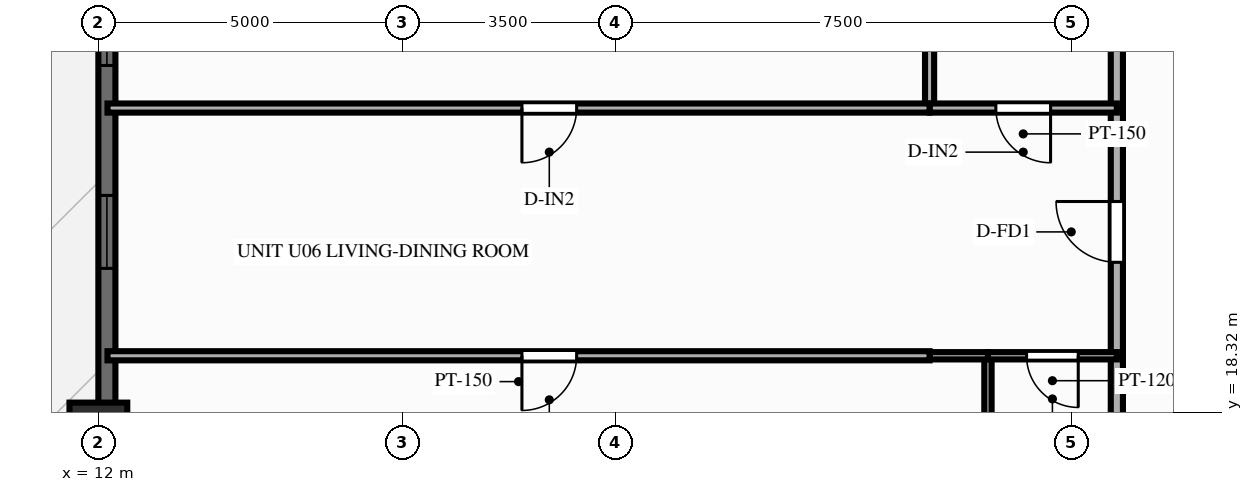
"""IFC4 building model, lengths in metres.
Left out: names, types, materials, properties, quantities, classifications, styles, units other than length and angle.
Written with IfcOpenShell. Run it as: python <this file> out.ifc"""

import sys

from ifc_helpers import new_model, si_unit, direction, frame, frame_2d, origin, origin_2d, place, context, subcontext, project, spatial, rectangle, extrude, source, transform, mapped, element, fill, save


model = new_model("IFC4")
c1 = context("Model", 3, precision=1e-05, world=origin(), true_north=direction((0.0, 1.0)))
c2 = subcontext(c1, "Body", "Model", "MODEL_VIEW")
j1 = project(units=[si_unit("LENGTHUNIT", "METRE"), si_unit("PLANEANGLEUNIT", "RADIAN")], contexts=[c1])
p1 = place(None, origin())
s1 = spatial("IfcSite", under=j1, at=p1, CompositionType="ELEMENT")
p2 = place(p1, origin())
s2 = spatial("IfcBuilding", under=s1, at=p2, CompositionType="ELEMENT")
p3 = place(p2, frame((0.0, 0.0, 113.85)))
s3 = spatial("IfcBuildingStorey", under=s2, at=p3, CompositionType="ELEMENT", Elevation=113.85)
m1 = source(origin(), c2, "Body", "SweptSolid", [
    extrude(rectangle(XDim=0.95, YDim=0.95, at=origin_2d()), origin(), (0.0, 0.0, 1.0), 3.0),
])
p4 = place(p3, frame((12.0, 18.0, 0.0), z_axis=(0.0, 0.0, 1.0), x_axis=(1.0, 0.0, 0.0)))
e1 = element("IfcColumn", 1, at=p4, inside=s3, PredefinedType="COLUMN", context=c2, shape_type="MappedRepresentation", body=[
    mapped(m1, transform((0.0, 0.0, 0.0), scale=1.0)),
])
p5 = place(p3, frame((12.14, 7.2, 0.0), z_axis=(0.0, 0.0, 1.0), x_axis=(0.0, 1.0, 0.0)))
e2 = element("IfcWall", 2, at=p5, inside=s3, PredefinedType="SOLIDWALL", context=c2, shape_type="SweptSolid", body=[
    extrude(rectangle(XDim=39.6, YDim=0.28, at=frame_2d((19.8, 0.0))), origin(), (0.0, 0.0, 1.0), 2.28),
])
p6 = place(p5, frame((0.945, 0.0, 0.25)))
e3 = element("IfcOpeningElement", 3, at=p6, cuts=e2, PredefinedType="OPENING", context=c2, shape_type="SweptSolid", body=[
    extrude(rectangle(XDim=1.2, YDim=1.5, at=frame_2d((0.6, 0.75))), frame((0.0, 0.152, 0.0), z_axis=(0.0, -1.0, 0.0), x_axis=(1.0, 0.0, 0.0)), (0.0, 0.0, 1.0), 0.304),
])
p7 = place(p5, frame((4.213, 0.0, 0.25)))
e4 = element("IfcOpeningElement", 4, at=p7, cuts=e2, PredefinedType="OPENING", context=c2, shape_type="SweptSolid", body=[
    extrude(rectangle(XDim=1.2, YDim=1.5, at=frame_2d((0.6, 0.75))), frame((0.0, 0.152, 0.0), z_axis=(0.0, -1.0, 0.0), x_axis=(1.0, 0.0, 0.0)), (0.0, 0.0, 1.0), 0.304),
])
p8 = place(p5, frame((7.55, 0.0, 0.25)))
e5 = element("IfcOpeningElement", 5, at=p8, cuts=e2, PredefinedType="OPENING", context=c2, shape_type="SweptSolid", body=[
    extrude(rectangle(XDim=1.2, YDim=1.5, at=frame_2d((0.6, 0.75))), frame((0.0, 0.152, 0.0), z_axis=(0.0, -1.0, 0.0), x_axis=(1.0, 0.0, 0.0)), (0.0, 0.0, 1.0), 0.304),
])
p9 = place(p5, frame((13.483, 0.0, 0.25)))
e6 = element("IfcOpeningElement", 6, at=p9, cuts=e2, PredefinedType="OPENING", context=c2, shape_type="SweptSolid", body=[
    extrude(rectangle(XDim=1.2, YDim=1.5, at=frame_2d((0.6, 0.75))), frame((0.0, 0.152, 0.0), z_axis=(0.0, -1.0, 0.0), x_axis=(1.0, 0.0, 0.0)), (0.0, 0.0, 1.0), 0.304),
])
p10 = place(p5, frame((16.82, 0.0, 0.25)))
e7 = element("IfcOpeningElement", 7, at=p10, cuts=e2, PredefinedType="OPENING", context=c2, shape_type="SweptSolid", body=[
    extrude(rectangle(XDim=1.2, YDim=1.5, at=frame_2d((0.6, 0.75))), frame((0.0, 0.152, 0.0), z_axis=(0.0, -1.0, 0.0), x_axis=(1.0, 0.0, 0.0)), (0.0, 0.0, 1.0), 0.304),
])
p11 = place(p5, frame((19.2, 0.0, 0.25)))
e8 = element("IfcOpeningElement", 8, at=p11, cuts=e2, PredefinedType="OPENING", context=c2, shape_type="SweptSolid", body=[
    extrude(rectangle(XDim=1.2, YDim=1.5, at=frame_2d((0.6, 0.75))), frame((0.0, 0.152, 0.0), z_axis=(0.0, -1.0, 0.0), x_axis=(1.0, 0.0, 0.0)), (0.0, 0.0, 1.0), 0.304),
])
p12 = place(p5, frame((21.992, 0.0, 0.0)))
e9 = element("IfcOpeningElement", 9, at=p12, cuts=e2, PredefinedType="OPENING", context=c2, shape_type="SweptSolid", body=[
    extrude(rectangle(XDim=1.6, YDim=2.15, at=frame_2d((0.8, 1.075))), frame((0.0, 0.152, 0.0), z_axis=(0.0, -1.0, 0.0), x_axis=(1.0, 0.0, 0.0)), (0.0, 0.0, 1.0), 0.304),
])
p13 = place(p5, frame((25.529, 0.0, 0.25)))
e10 = element("IfcOpeningElement", 10, at=p13, cuts=e2, PredefinedType="OPENING", context=c2, shape_type="SweptSolid", body=[
    extrude(rectangle(XDim=1.2, YDim=1.5, at=frame_2d((0.6, 0.75))), frame((0.0, 0.152, 0.0), z_axis=(0.0, -1.0, 0.0), x_axis=(1.0, 0.0, 0.0)), (0.0, 0.0, 1.0), 0.304),
])
p14 = place(p5, frame((29.349, 0.0, 0.25)))
e11 = element("IfcOpeningElement", 11, at=p14, cuts=e2, PredefinedType="OPENING", context=c2, shape_type="SweptSolid", body=[
    extrude(rectangle(XDim=0.7, YDim=1.5, at=frame_2d((0.35, 0.75))), frame((0.0, 0.152, 0.0), z_axis=(0.0, -1.0, 0.0), x_axis=(1.0, 0.0, 0.0)), (0.0, 0.0, 1.0), 0.304),
])
p15 = place(p5, frame((31.285, 0.0, 0.25)))
e12 = element("IfcOpeningElement", 12, at=p15, cuts=e2, PredefinedType="OPENING", context=c2, shape_type="SweptSolid", body=[
    extrude(rectangle(XDim=1.2, YDim=1.5, at=frame_2d((0.6, 0.75))), frame((0.0, 0.152, 0.0), z_axis=(0.0, -1.0, 0.0), x_axis=(1.0, 0.0, 0.0)), (0.0, 0.0, 1.0), 0.304),
])
p16 = place(p5, frame((34.252, 0.0, 0.25)))
e13 = element("IfcOpeningElement", 13, at=p16, cuts=e2, PredefinedType="OPENING", context=c2, shape_type="SweptSolid", body=[
    extrude(rectangle(XDim=1.2, YDim=1.5, at=frame_2d((0.6, 0.75))), frame((0.0, 0.152, 0.0), z_axis=(0.0, -1.0, 0.0), x_axis=(1.0, 0.0, 0.0)), (0.0, 0.0, 1.0), 0.304),
])
p17 = place(p5, frame((37.151, 0.0, 0.25)))
e14 = element("IfcOpeningElement", 14, at=p17, cuts=e2, PredefinedType="OPENING", context=c2, shape_type="SweptSolid", body=[
    extrude(rectangle(XDim=1.2, YDim=1.5, at=frame_2d((0.6, 0.75))), frame((0.0, 0.152, 0.0), z_axis=(0.0, -1.0, 0.0), x_axis=(1.0, 0.0, 0.0)), (0.0, 0.0, 1.0), 0.304),
])
p18 = place(p3, frame((28.75, 16.65, 0.0), z_axis=(0.0, 0.0, 1.0), x_axis=(0.0, 1.0, 0.0)))
e15 = element("IfcWall", 15, at=p18, inside=s3, PredefinedType="PARTITIONING", context=c2, shape_type="SweptSolid", body=[
    extrude(rectangle(XDim=2.596, YDim=0.2, at=frame_2d((1.298, 0.0))), origin(), (0.0, 0.0, 1.0), 2.79),
])
p19 = place(p3, frame((28.75, 19.246, 0.0), z_axis=(0.0, 0.0, 1.0), x_axis=(0.0, 1.0, 0.0)))
e16 = element("IfcWall", 16, at=p19, inside=s3, PredefinedType="PARTITIONING", context=c2, shape_type="SweptSolid", body=[
    extrude(rectangle(XDim=4.074, YDim=0.2, at=frame_2d((2.037, 0.0))), origin(), (0.0, 0.0, 1.0), 2.79),
])
p20 = place(p19, frame((1.537, 0.0, 0.0)))
e17 = element("IfcOpeningElement", 17, at=p20, cuts=e16, PredefinedType="OPENING", context=c2, shape_type="SweptSolid", body=[
    extrude(rectangle(XDim=1.0, YDim=2.15, at=frame_2d((0.5, 1.075))), frame((0.0, 0.112, 0.0), z_axis=(0.0, -1.0, 0.0), x_axis=(1.0, 0.0, 0.0)), (0.0, 0.0, 1.0), 0.224),
])
p21 = place(p3, frame((28.75, 23.32, 0.0), z_axis=(0.0, 0.0, 1.0), x_axis=(0.0, 1.0, 0.0)))
e18 = element("IfcWall", 18, at=p21, inside=s3, PredefinedType="PARTITIONING", context=c2, shape_type="SweptSolid", body=[
    extrude(rectangle(XDim=2.6, YDim=0.2, at=frame_2d((1.3, 0.0))), origin(), (0.0, 0.0, 1.0), 2.79),
])
p22 = place(p3, frame((26.63, 16.65, 0.0), z_axis=(0.0, 0.0, 1.0), x_axis=(0.0, 1.0, 0.0)))
e19 = element("IfcWall", 19, at=p22, inside=s3, PredefinedType="PARTITIONING", context=c2, shape_type="SweptSolid", body=[
    extrude(rectangle(XDim=2.596, YDim=0.12, at=frame_2d((1.298, 0.0))), origin(), (0.0, 0.0, 1.0), 2.79),
])
p23 = place(p3, frame((25.67, 23.32, 0.0), z_axis=(0.0, 0.0, 1.0), x_axis=(0.0, 1.0, 0.0)))
e20 = element("IfcWall", 20, at=p23, inside=s3, PredefinedType="PARTITIONING", context=c2, shape_type="SweptSolid", body=[
    extrude(rectangle(XDim=2.6, YDim=0.15, at=frame_2d((1.3, 0.0))), origin(), (0.0, 0.0, 1.0), 2.79),
])
p24 = place(p3, frame((28.75, 19.246, 0.0), z_axis=(0.0, 0.0, 1.0), x_axis=(-1.0, 0.0, 0.0)))
e21 = element("IfcWall", 21, at=p24, inside=s3, PredefinedType="PARTITIONING", context=c2, shape_type="SweptSolid", body=[
    extrude(rectangle(XDim=2.12, YDim=0.12, at=frame_2d((1.06, 0.0))), origin(), (0.0, 0.0, 1.0), 2.79),
])
p25 = place(p24, frame((0.635, 0.0, 0.0)))
e22 = element("IfcOpeningElement", 22, at=p25, cuts=e21, PredefinedType="OPENING", context=c2, shape_type="SweptSolid", body=[
    extrude(rectangle(XDim=0.85, YDim=2.05, at=frame_2d((0.425, 1.025))), frame((0.0, 0.072, 0.0), z_axis=(0.0, -1.0, 0.0), x_axis=(1.0, 0.0, 0.0)), (0.0, 0.0, 1.0), 0.144),
])
p26 = place(p3, frame((26.63, 19.246, 0.0), z_axis=(0.0, 0.0, 1.0), x_axis=(-1.0, 0.0, 0.0)))
e23 = element("IfcWall", 23, at=p26, inside=s3, PredefinedType="PARTITIONING", context=c2, shape_type="SweptSolid", body=[
    extrude(rectangle(XDim=0.96, YDim=0.12, at=frame_2d((0.48, 0.0))), origin(), (0.0, 0.0, 1.0), 2.79),
])
p27 = place(p3, frame((25.67, 19.246, 0.0), z_axis=(0.0, 0.0, 1.0), x_axis=(-1.0, 0.0, 0.0)))
e24 = element("IfcWall", 24, at=p27, inside=s3, PredefinedType="PARTITIONING", context=c2, shape_type="SweptSolid", body=[
    extrude(rectangle(XDim=13.52, YDim=0.15, at=frame_2d((6.76, 0.0))), origin(), (0.0, 0.0, 1.0), 2.79),
])
p28 = place(p27, frame((5.804, 0.0, 0.0)))
e25 = element("IfcOpeningElement", 25, at=p28, cuts=e24, PredefinedType="OPENING", context=c2, shape_type="SweptSolid", body=[
    extrude(rectangle(XDim=0.9, YDim=2.1, at=frame_2d((0.45, 1.05))), frame((0.0, 0.087, 0.0), z_axis=(0.0, -1.0, 0.0), x_axis=(1.0, 0.0, 0.0)), (0.0, 0.0, 1.0), 0.174),
])
p29 = place(p3, frame((28.75, 23.32, 0.0), z_axis=(0.0, 0.0, 1.0), x_axis=(-1.0, 0.0, 0.0)))
e26 = element("IfcWall", 26, at=p29, inside=s3, PredefinedType="PARTITIONING", context=c2, shape_type="SweptSolid", body=[
    extrude(rectangle(XDim=3.08, YDim=0.15, at=frame_2d((1.54, 0.0))), origin(), (0.0, 0.0, 1.0), 2.79),
])
p30 = place(p29, frame((1.09, 0.0, 0.0)))
e27 = element("IfcOpeningElement", 27, at=p30, cuts=e26, PredefinedType="OPENING", context=c2, shape_type="SweptSolid", body=[
    extrude(rectangle(XDim=0.9, YDim=2.1, at=frame_2d((0.45, 1.05))), frame((0.0, 0.087, 0.0), z_axis=(0.0, -1.0, 0.0), x_axis=(1.0, 0.0, 0.0)), (0.0, 0.0, 1.0), 0.174),
])
p31 = place(p3, frame((25.67, 23.32, 0.0), z_axis=(0.0, 0.0, 1.0), x_axis=(-1.0, 0.0, 0.0)))
e28 = element("IfcWall", 28, at=p31, inside=s3, PredefinedType="PARTITIONING", context=c2, shape_type="SweptSolid", body=[
    extrude(rectangle(XDim=13.52, YDim=0.15, at=frame_2d((6.76, 0.0))), origin(), (0.0, 0.0, 1.0), 2.79),
])
p32 = place(p31, frame((5.804, 0.0, 0.0)))
e29 = element("IfcOpeningElement", 29, at=p32, cuts=e28, PredefinedType="OPENING", context=c2, shape_type="SweptSolid", body=[
    extrude(rectangle(XDim=0.9, YDim=2.1, at=frame_2d((0.45, 1.05))), frame((0.0, 0.087, 0.0), z_axis=(0.0, -1.0, 0.0), x_axis=(1.0, 0.0, 0.0)), (0.0, 0.0, 1.0), 0.174),
])
m2 = source(origin(), c2, "Body", "SweptSolid", [
    extrude(rectangle(XDim=1.2, YDim=1.5, at=frame_2d((0.6, 0.75))), frame((0.0, 0.03, 0.0), z_axis=(0.0, -1.0, 0.0), x_axis=(1.0, 0.0, 0.0)), (0.0, 0.0, 1.0), 0.06),
])
p33 = place(p9, origin())
e30 = element("IfcWindow", 30, at=p33, inside=s3, PartitioningType="SINGLE_PANEL", PredefinedType="WINDOW", context=c2, shape_type="MappedRepresentation", body=[
    mapped(m2, transform((0.0, 0.0, 0.0), scale=1.0)),
])
fill(e6, e30)
p34 = place(p10, origin())
e31 = element("IfcWindow", 31, at=p34, inside=s3, PartitioningType="SINGLE_PANEL", PredefinedType="WINDOW", context=c2, shape_type="MappedRepresentation", body=[
    mapped(m2, transform((0.0, 0.0, 0.0), scale=1.0)),
])
fill(e7, e31)
m3 = source(origin(), c2, "Body", "SweptSolid", [
    extrude(rectangle(XDim=1.0, YDim=2.15, at=frame_2d((0.5, 1.075))), frame((0.0, 0.025, 0.0), z_axis=(0.0, -1.0, 0.0), x_axis=(1.0, 0.0, 0.0)), (0.0, 0.0, 1.0), 0.05),
])
p35 = place(p20, origin())
e32 = element("IfcDoor", 32, at=p35, inside=s3, OperationType="SINGLE_SWING_RIGHT", PredefinedType="DOOR", context=c2, shape_type="MappedRepresentation", body=[
    mapped(m3, transform((0.0, 0.0, 0.0), scale=1.0)),
])
fill(e17, e32)
m4 = source(origin(), c2, "Body", "SweptSolid", [
    extrude(rectangle(XDim=0.85, YDim=2.05, at=frame_2d((0.425, 1.025))), frame((0.0, 0.025, 0.0), z_axis=(0.0, -1.0, 0.0), x_axis=(1.0, 0.0, 0.0)), (0.0, 0.0, 1.0), 0.05),
])
p36 = place(p25, origin())
e33 = element("IfcDoor", 33, at=p36, inside=s3, OperationType="SINGLE_SWING_LEFT", PredefinedType="DOOR", context=c2, shape_type="MappedRepresentation", body=[
    mapped(m4, transform((0.0, 0.0, 0.0), scale=1.0)),
])
fill(e22, e33)
m5 = source(origin(), c2, "Body", "SweptSolid", [
    extrude(rectangle(XDim=0.9, YDim=2.1, at=frame_2d((0.45, 1.05))), frame((0.0, 0.025, 0.0), z_axis=(0.0, -1.0, 0.0), x_axis=(1.0, 0.0, 0.0)), (0.0, 0.0, 1.0), 0.05),
])
p37 = place(p28, origin())
e34 = element("IfcDoor", 34, at=p37, inside=s3, OperationType="SINGLE_SWING_RIGHT", PredefinedType="DOOR", context=c2, shape_type="MappedRepresentation", body=[
    mapped(m5, transform((0.0, 0.0, 0.0), scale=1.0)),
])
fill(e25, e34)
p38 = place(p30, origin())
e35 = element("IfcDoor", 35, at=p38, inside=s3, OperationType="SINGLE_SWING_LEFT", PredefinedType="DOOR", context=c2, shape_type="MappedRepresentation", body=[
    mapped(m5, transform((0.0, 0.0, 0.0), scale=1.0)),
])
fill(e27, e35)
p39 = place(p32, origin())
e36 = element("IfcDoor", 36, at=p39, inside=s3, OperationType="SINGLE_SWING_RIGHT", PredefinedType="DOOR", context=c2, shape_type="MappedRepresentation", body=[
    mapped(m5, transform((0.0, 0.0, 0.0), scale=1.0)),
])
fill(e29, e36)
save(model, sys.argv[1])
